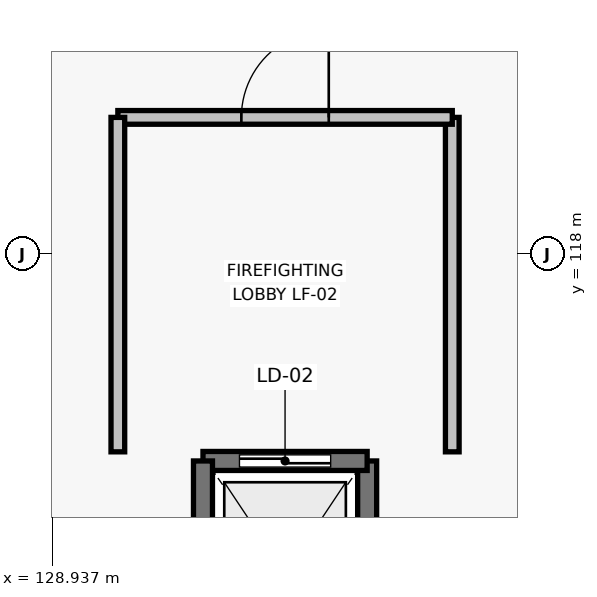
"""IFC4 building model, lengths in metres.
Left out: names, types, materials, properties, quantities, classifications, styles, units other than length and angle.
Written with IfcOpenShell. Run it as: python <this file> out.ifc"""

import sys

from ifc_helpers import new_model, si_unit, direction, frame, frame_2d, origin, place, context, subcontext, project, spatial, rectangle, extrude, element, fill, save


model = new_model("IFC4")
c1 = context("Model", 3, precision=1e-05, world=origin(), true_north=direction((0.0, 1.0)))
c2 = subcontext(c1, "Body", "Model", "MODEL_VIEW")
j1 = project(units=[si_unit("LENGTHUNIT", "METRE"), si_unit("PLANEANGLEUNIT", "RADIAN")], contexts=[c1])
p1 = place(None, origin())
s1 = spatial("IfcSite", under=j1, at=p1, CompositionType="ELEMENT")
p2 = place(p1, origin())
s2 = spatial("IfcBuilding", under=s1, at=p2, CompositionType="ELEMENT")
p3 = place(p2, origin())
s3 = spatial("IfcBuildingStorey", under=s2, at=p3, CompositionType="ELEMENT", Elevation=0.0)
p4 = place(p3, frame((133.08, 112.32, 0.0), z_axis=(0.0, 0.0, 1.0), x_axis=(0.0, 1.0, 0.0)))
e1 = element("IfcWall", 1, at=p4, inside=s3, PredefinedType="SHEAR", context=c2, shape_type="SweptSolid", body=[
    extrude(rectangle(XDim=2.96, YDim=0.25, at=frame_2d((1.48, 0.0))), origin(), (0.0, 0.0, 1.0), 5.16),
])
p5 = place(p3, frame((133.08, 115.28, 0.0), z_axis=(0.0, 0.0, 1.0), x_axis=(-1.0, 0.0, 0.0)))
e2 = element("IfcWall", 2, at=p5, inside=s3, PredefinedType="SHEAR", context=c2, shape_type="SweptSolid", body=[
    extrude(rectangle(XDim=2.16, YDim=0.25, at=frame_2d((1.08, 0.0))), origin(), (0.0, 0.0, 1.0), 5.16),
])
p6 = place(p5, frame((0.48, 0.0, 0.0)))
e3 = element("IfcOpeningElement", 3, at=p6, cuts=e2, PredefinedType="OPENING", context=c2, shape_type="SweptSolid", body=[
    extrude(rectangle(XDim=1.2, YDim=2.2, at=frame_2d((0.6, 1.1))), frame((0.0, 0.135, 0.0), z_axis=(0.0, -1.0, 0.0), x_axis=(1.0, 0.0, 0.0)), (0.0, 0.0, 1.0), 0.27),
])
p7 = place(p3, frame((130.92, 115.28, 0.0), z_axis=(0.0, 0.0, 1.0), x_axis=(0.0, -1.0, 0.0)))
e4 = element("IfcWall", 4, at=p7, inside=s3, PredefinedType="SHEAR", context=c2, shape_type="SweptSolid", body=[
    extrude(rectangle(XDim=2.96, YDim=0.25, at=frame_2d((1.48, 0.0))), origin(), (0.0, 0.0, 1.0), 5.16),
])
p8 = place(p3, frame((134.2, 115.4, 0.0), z_axis=(0.0, 0.0, 1.0), x_axis=(0.0, 1.0, 0.0)))
e5 = element("IfcWall", 5, at=p8, inside=s3, PredefinedType="PARTITIONING", context=c2, shape_type="SweptSolid", body=[
    extrude(rectangle(XDim=4.4, YDim=0.18, at=frame_2d((2.2, 0.0))), origin(), (0.0, 0.0, 1.0), 4.795),
])
p9 = place(p3, frame((134.2, 119.8, 0.0), z_axis=(0.0, 0.0, 1.0), x_axis=(-1.0, 0.0, 0.0)))
e6 = element("IfcWall", 6, at=p9, inside=s3, PredefinedType="PARTITIONING", context=c2, shape_type="SweptSolid", body=[
    extrude(rectangle(XDim=4.4, YDim=0.18, at=frame_2d((2.2, 0.0))), origin(), (0.0, 0.0, 1.0), 5.16),
])
p10 = place(p9, frame((2.775, 0.0, 0.0), z_axis=(0.0, 0.0, 1.0), x_axis=(-1.0, 0.0, 0.0)))
e7 = element("IfcOpeningElement", 7, at=p10, cuts=e6, PredefinedType="OPENING", context=c2, shape_type="SweptSolid", body=[
    extrude(rectangle(XDim=1.15, YDim=2.2, at=frame_2d((0.575, 1.1))), frame((0.0, 0.1, 0.0), z_axis=(0.0, -1.0, 0.0), x_axis=(1.0, 0.0, 0.0)), (0.0, 0.0, 1.0), 0.2),
])
p11 = place(p3, frame((129.8, 119.8, 0.0), z_axis=(0.0, 0.0, 1.0), x_axis=(0.0, -1.0, 0.0)))
e8 = element("IfcWall", 8, at=p11, inside=s3, PredefinedType="PARTITIONING", context=c2, shape_type="SweptSolid", body=[
    extrude(rectangle(XDim=4.4, YDim=0.18, at=frame_2d((2.2, 0.0))), origin(), (0.0, 0.0, 1.0), 5.16),
])
p12 = place(p6, origin())
e9 = element("IfcDoor", 9, at=p12, inside=s3, OperationType="SLIDING_TO_RIGHT", PredefinedType="DOOR", context=c2, shape_type="SweptSolid", body=[
    extrude(rectangle(XDim=1.2, YDim=2.2, at=frame_2d((0.6, 1.1))), frame((0.0, 0.025, 0.0), z_axis=(0.0, -1.0, 0.0), x_axis=(1.0, 0.0, 0.0)), (0.0, 0.0, 1.0), 0.05),
])
fill(e3, e9)
p13 = place(p10, origin())
e10 = element("IfcDoor", 10, at=p13, inside=s3, OperationType="SINGLE_SWING_LEFT", PredefinedType="DOOR", context=c2, shape_type="SweptSolid", body=[
    extrude(rectangle(XDim=1.15, YDim=2.2, at=frame_2d((0.575, 1.1))), frame((0.0, 0.025, 0.0), z_axis=(0.0, -1.0, 0.0), x_axis=(1.0, 0.0, 0.0)), (0.0, 0.0, 1.0), 0.05),
])
fill(e7, e10)
save(model, sys.argv[1])
